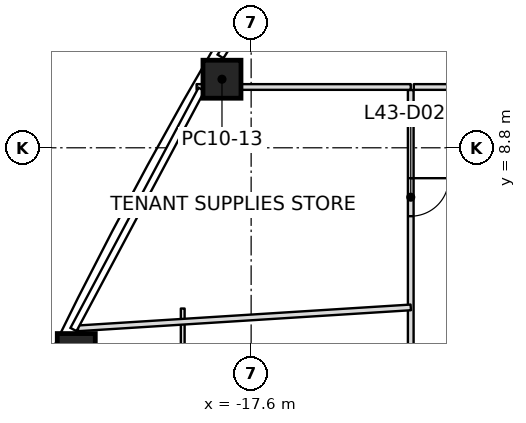
"""IFC4 building model, lengths in metres.
Left out: names, types, materials, properties, quantities, classifications, styles, units other than length and angle.
Written with IfcOpenShell. Run it as: python <this file> out.ifc"""

import sys

from ifc_helpers import new_model, si_unit, direction, frame, frame_2d, origin, origin_2d, place, context, subcontext, project, spatial, rectangle, extrude, element, fill, save


model = new_model("IFC4")
c1 = context("Model", 3, precision=1e-05, world=origin(), true_north=direction((0.0, 1.0)))
c2 = subcontext(c1, "Body", "Model", "MODEL_VIEW")
j1 = project(units=[si_unit("LENGTHUNIT", "METRE"), si_unit("PLANEANGLEUNIT", "RADIAN")], contexts=[c1])
p1 = place(None, origin())
s1 = spatial("IfcSite", under=j1, at=p1, CompositionType="ELEMENT")
p2 = place(p1, origin())
s2 = spatial("IfcBuilding", under=s1, at=p2, CompositionType="ELEMENT")
p3 = place(p2, frame((0.0, 0.0, 193.8)))
s3 = spatial("IfcBuildingStorey", under=s2, at=p3, CompositionType="ELEMENT", Elevation=193.8)
p4 = place(p3, frame((-18.367, 10.604, 0.0), z_axis=(0.009887049298, -0.00573692984, 0.999934664812), x_axis=(0.499975560967, 0.866039512843, 2.5126546e-05)))
e1 = element("IfcColumn", 1, at=p4, inside=s3, PredefinedType="COLUMN", context=c2, shape_type="SweptSolid", body=[
    extrude(rectangle(XDim=1.0, YDim=1.0, at=origin_2d()), origin(), (0.0, 0.0, 1.0), 4.0),
])
p5 = place(p3, frame((-22.201, 3.412, 0.0), z_axis=(0.014097689605, 0.002074984617, 0.999898469639), x_axis=(0.440182224659, 0.89787220315, -0.008069442676)))
e2 = element("IfcColumn", 2, at=p5, inside=s3, PredefinedType="COLUMN", context=c2, shape_type="SweptSolid", body=[
    extrude(rectangle(XDim=1.0, YDim=1.0, at=origin_2d()), origin(), (0.0, 0.0, 1.0), 4.0),
])
p6 = place(p3, frame((-13.4, 4.6, 0.0), z_axis=(0.0, 0.0, 1.0), x_axis=(-0.998024766406, -0.062821697216, 0.0)))
e3 = element("IfcWall", 3, at=p6, inside=s3, PredefinedType="PARTITIONING", context=c2, shape_type="SweptSolid", body=[
    extrude(rectangle(XDim=8.775, YDim=0.15, at=frame_2d((4.388, 0.0))), origin(), (0.0, 0.0, 1.0), 3.234),
])
p7 = place(p3, frame((-13.4, 10.4, 0.0), z_axis=(0.0, 0.0, 1.0), x_axis=(-1.0, 0.0, 0.0)))
e4 = element("IfcWall", 4, at=p7, inside=s3, PredefinedType="PARTITIONING", context=c2, shape_type="SweptSolid", body=[
    extrude(rectangle(XDim=5.635, YDim=0.15, at=frame_2d((2.817, 0.0))), origin(), (0.0, 0.0, 1.0), 3.45),
])
p8 = place(p3, frame((-13.4, 10.32, 0.0), z_axis=(0.0, 0.0, 1.0), x_axis=(0.0, -1.0, 0.0)))
e5 = element("IfcWall", 5, at=p8, inside=s3, PredefinedType="PARTITIONING", context=c2, shape_type="SweptSolid", body=[
    extrude(rectangle(XDim=20.64, YDim=0.15, at=frame_2d((10.32, 0.0))), origin(), (0.0, 0.0, 1.0), 3.166),
])
p9 = place(p8, frame((2.32, 0.0, 0.0)))
e6 = element("IfcOpeningElement", 6, at=p9, cuts=e5, PredefinedType="OPENING", context=c2, shape_type="SweptSolid", body=[
    extrude(rectangle(XDim=1.0, YDim=2.1, at=frame_2d((0.5, 1.05))), frame((0.0, 0.075, 0.0), z_axis=(0.0, -1.0, 0.0), x_axis=(1.0, 0.0, 0.0)), (0.0, 0.0, 1.0), 0.15),
])
p10 = place(p8, frame((7.77, 0.0, 0.0)))
e7 = element("IfcOpeningElement", 7, at=p10, cuts=e5, PredefinedType="OPENING", context=c2, shape_type="SweptSolid", body=[
    extrude(rectangle(XDim=0.9, YDim=2.1, at=frame_2d((0.45, 1.05))), frame((0.0, 0.075, 0.0), z_axis=(0.0, -1.0, 0.0), x_axis=(1.0, 0.0, 0.0)), (0.0, 0.0, 1.0), 0.15),
])
p11 = place(p8, frame((15.28, 0.0, 0.0)))
e8 = element("IfcOpeningElement", 8, at=p11, cuts=e5, PredefinedType="OPENING", context=c2, shape_type="SweptSolid", body=[
    extrude(rectangle(XDim=1.0, YDim=2.1, at=frame_2d((0.5, 1.05))), frame((0.0, 0.075, 0.0), z_axis=(0.0, -1.0, 0.0), x_axis=(1.0, 0.0, 0.0)), (0.0, 0.0, 1.0), 0.15),
])
p12 = place(p3, frame((13.32, 10.4, 0.0), z_axis=(0.0, 0.0, 1.0), x_axis=(-1.0, 0.0, 0.0)))
e9 = element("IfcWall", 9, at=p12, inside=s3, PredefinedType="PARTITIONING", context=c2, shape_type="SweptSolid", body=[
    extrude(rectangle(XDim=26.64, YDim=0.15, at=frame_2d((13.32, 0.0))), origin(), (0.0, 0.0, 1.0), 3.166),
])
p13 = place(p12, frame((1.95, 0.0, 0.0)))
e10 = element("IfcOpeningElement", 10, at=p13, cuts=e9, PredefinedType="OPENING", context=c2, shape_type="SweptSolid", body=[
    extrude(rectangle(XDim=0.9, YDim=2.1, at=frame_2d((0.45, 1.05))), frame((0.0, 0.075, 0.0), z_axis=(0.0, -1.0, 0.0), x_axis=(1.0, 0.0, 0.0)), (0.0, 0.0, 1.0), 0.15),
])
p14 = place(p12, frame((9.11, 0.0, 0.0)))
e11 = element("IfcOpeningElement", 11, at=p14, cuts=e9, PredefinedType="OPENING", context=c2, shape_type="SweptSolid", body=[
    extrude(rectangle(XDim=1.0, YDim=2.1, at=frame_2d((0.5, 1.05))), frame((0.0, 0.075, 0.0), z_axis=(0.0, -1.0, 0.0), x_axis=(1.0, 0.0, 0.0)), (0.0, 0.0, 1.0), 0.15),
])
p15 = place(p12, frame((15.57, 0.0, 0.0)))
e12 = element("IfcOpeningElement", 12, at=p15, cuts=e9, PredefinedType="OPENING", context=c2, shape_type="SweptSolid", body=[
    extrude(rectangle(XDim=0.9, YDim=2.1, at=frame_2d((0.45, 1.05))), frame((0.0, 0.075, 0.0), z_axis=(0.0, -1.0, 0.0), x_axis=(1.0, 0.0, 0.0)), (0.0, 0.0, 1.0), 0.15),
])
p16 = place(p12, frame((21.83, 0.0, 0.0)))
e13 = element("IfcOpeningElement", 13, at=p16, cuts=e9, PredefinedType="OPENING", context=c2, shape_type="SweptSolid", body=[
    extrude(rectangle(XDim=1.0, YDim=2.1, at=frame_2d((0.5, 1.05))), frame((0.0, 0.075, 0.0), z_axis=(0.0, -1.0, 0.0), x_axis=(1.0, 0.0, 0.0)), (0.0, 0.0, 1.0), 0.15),
])
p17 = place(p3, frame((-19.4, -0.4, 0.0), z_axis=(0.0, 0.0, 1.0), x_axis=(0.0, 1.0, 0.0)))
e14 = element("IfcWall", 14, at=p17, inside=s3, PredefinedType="PARTITIONING", context=c2, shape_type="SweptSolid", body=[
    extrude(rectangle(XDim=4.97, YDim=0.1, at=frame_2d((2.485, 0.0))), origin(), (0.0, 0.0, 1.0), 3.45),
])
p18 = place(p9, origin())
e15 = element("IfcDoor", 15, at=p18, inside=s3, OperationType="SINGLE_SWING_LEFT", PredefinedType="DOOR", context=c2, shape_type="SweptSolid", body=[
    extrude(rectangle(XDim=1.0, YDim=2.1, at=frame_2d((0.5, 1.05))), frame((0.0, 0.025, 0.0), z_axis=(0.0, -1.0, 0.0), x_axis=(1.0, 0.0, 0.0)), (0.0, 0.0, 1.0), 0.05),
])
fill(e6, e15)
save(model, sys.argv[1])
